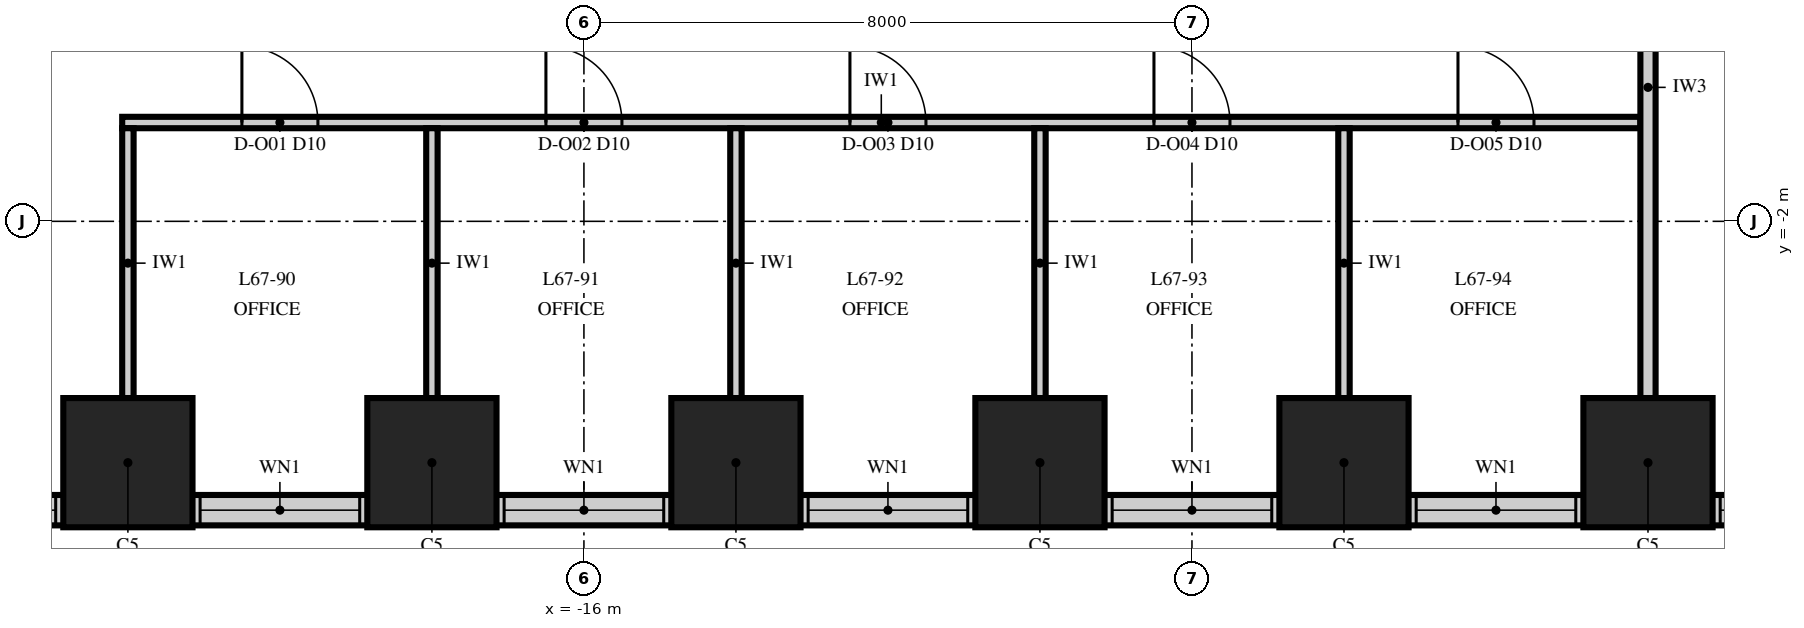
"""IFC4 building model, lengths in metres.
Left out: names, types, materials, properties, quantities, classifications, styles, units other than length and angle.
Written with IfcOpenShell. Run it as: python <this file> out.ifc"""

import sys

from ifc_helpers import new_model, si_unit, direction, frame, frame_2d, origin, origin_2d, place, context, subcontext, project, spatial, rectangle, extrude, element, fill, save


model = new_model("IFC4")
c1 = context("Model", 3, precision=1e-05, world=origin(), true_north=direction((0.0, 1.0)))
c2 = subcontext(c1, "Body", "Model", "MODEL_VIEW")
j1 = project(units=[si_unit("LENGTHUNIT", "METRE"), si_unit("PLANEANGLEUNIT", "RADIAN")], contexts=[c1])
p1 = place(None, origin())
s1 = spatial("IfcSite", under=j1, at=p1, CompositionType="ELEMENT")
p2 = place(p1, origin())
s2 = spatial("IfcBuilding", under=s1, at=p2, CompositionType="ELEMENT")
p3 = place(p2, frame((0.0, 0.0, 288.0)))
s3 = spatial("IfcBuildingStorey", under=s2, at=p3, CompositionType="ELEMENT", Elevation=288.0)
for number, where, z_axis, x_axis in (
    (1, (-22.0, -5.175, 0.0), (0.0, 0.0, 1.0), (1.0, 0.0, 0.0)),
    (2, (-18.0, -5.175, 0.0), (0.0, 0.0, 1.0), (1.0, 0.0, 0.0)),
    (3, (-14.0, -5.175, 0.0), (0.0, 0.0, 1.0), (1.0, 0.0, 0.0)),
    (4, (-10.0, -5.175, 0.0), (0.0, 0.0, 1.0), (1.0, 0.0, 0.0)),
    (5, (-6.0, -5.175, 0.0), (0.0, 0.0, 1.0), (1.0, 0.0, 0.0)),
    (6, (-2.0, -5.175, 0.0), (0.0, 0.0, 1.0), (1.0, 0.0, 0.0)),
):
    element("IfcColumn", number, at=place(p3, frame(where, z_axis=z_axis, x_axis=x_axis)), inside=s3, PredefinedType="COLUMN", context=c2, shape_type="SweptSolid", body=[
        extrude(rectangle(XDim=1.7, YDim=1.7, at=origin_2d()), origin(), (0.0, 0.0, 1.0), 4.0),
    ])
p4 = place(p3, frame((-26.0, -5.8, 0.0), z_axis=(0.0, 0.0, 1.0), x_axis=(1.0, 0.0, 0.0)))
e7 = element("IfcWall", 7, at=p4, inside=s3, PredefinedType="SOLIDWALL", context=c2, shape_type="SweptSolid", body=[
    extrude(rectangle(XDim=52.0, YDim=0.4, at=frame_2d((26.0, 0.0))), origin(), (0.0, 0.0, 1.0), 2.0),
])
p5 = place(p4, frame((0.95, 0.0, 0.8)))
e8 = element("IfcOpeningElement", 8, at=p5, cuts=e7, PredefinedType="OPENING", context=c2, shape_type="SweptSolid", body=[
    extrude(rectangle(XDim=2.1, YDim=1.15, at=frame_2d((1.05, 0.575))), frame((0.0, 0.215, 0.0), z_axis=(0.0, -1.0, 0.0), x_axis=(1.0, 0.0, 0.0)), (0.0, 0.0, 1.0), 0.43),
])
p6 = place(p4, frame((4.95, 0.0, 0.8)))
e9 = element("IfcOpeningElement", 9, at=p6, cuts=e7, PredefinedType="OPENING", context=c2, shape_type="SweptSolid", body=[
    extrude(rectangle(XDim=2.1, YDim=1.15, at=frame_2d((1.05, 0.575))), frame((0.0, 0.215, 0.0), z_axis=(0.0, -1.0, 0.0), x_axis=(1.0, 0.0, 0.0)), (0.0, 0.0, 1.0), 0.43),
])
p7 = place(p4, frame((8.95, 0.0, 0.8)))
e10 = element("IfcOpeningElement", 10, at=p7, cuts=e7, PredefinedType="OPENING", context=c2, shape_type="SweptSolid", body=[
    extrude(rectangle(XDim=2.1, YDim=1.15, at=frame_2d((1.05, 0.575))), frame((0.0, 0.215, 0.0), z_axis=(0.0, -1.0, 0.0), x_axis=(1.0, 0.0, 0.0)), (0.0, 0.0, 1.0), 0.43),
])
p8 = place(p4, frame((12.95, 0.0, 0.8)))
e11 = element("IfcOpeningElement", 11, at=p8, cuts=e7, PredefinedType="OPENING", context=c2, shape_type="SweptSolid", body=[
    extrude(rectangle(XDim=2.1, YDim=1.15, at=frame_2d((1.05, 0.575))), frame((0.0, 0.215, 0.0), z_axis=(0.0, -1.0, 0.0), x_axis=(1.0, 0.0, 0.0)), (0.0, 0.0, 1.0), 0.43),
])
p9 = place(p4, frame((16.95, 0.0, 0.8)))
e12 = element("IfcOpeningElement", 12, at=p9, cuts=e7, PredefinedType="OPENING", context=c2, shape_type="SweptSolid", body=[
    extrude(rectangle(XDim=2.1, YDim=1.15, at=frame_2d((1.05, 0.575))), frame((0.0, 0.215, 0.0), z_axis=(0.0, -1.0, 0.0), x_axis=(1.0, 0.0, 0.0)), (0.0, 0.0, 1.0), 0.43),
])
p10 = place(p4, frame((20.95, 0.0, 0.8)))
e13 = element("IfcOpeningElement", 13, at=p10, cuts=e7, PredefinedType="OPENING", context=c2, shape_type="SweptSolid", body=[
    extrude(rectangle(XDim=2.1, YDim=1.15, at=frame_2d((1.05, 0.575))), frame((0.0, 0.215, 0.0), z_axis=(0.0, -1.0, 0.0), x_axis=(1.0, 0.0, 0.0)), (0.0, 0.0, 1.0), 0.43),
])
p11 = place(p4, frame((24.95, 0.0, 0.8)))
e14 = element("IfcOpeningElement", 14, at=p11, cuts=e7, PredefinedType="OPENING", context=c2, shape_type="SweptSolid", body=[
    extrude(rectangle(XDim=2.1, YDim=1.15, at=frame_2d((1.05, 0.575))), frame((0.0, 0.215, 0.0), z_axis=(0.0, -1.0, 0.0), x_axis=(1.0, 0.0, 0.0)), (0.0, 0.0, 1.0), 0.43),
])
p12 = place(p4, frame((28.95, 0.0, 0.8)))
e15 = element("IfcOpeningElement", 15, at=p12, cuts=e7, PredefinedType="OPENING", context=c2, shape_type="SweptSolid", body=[
    extrude(rectangle(XDim=2.1, YDim=1.15, at=frame_2d((1.05, 0.575))), frame((0.0, 0.215, 0.0), z_axis=(0.0, -1.0, 0.0), x_axis=(1.0, 0.0, 0.0)), (0.0, 0.0, 1.0), 0.43),
])
p13 = place(p4, frame((32.95, 0.0, 0.8)))
e16 = element("IfcOpeningElement", 16, at=p13, cuts=e7, PredefinedType="OPENING", context=c2, shape_type="SweptSolid", body=[
    extrude(rectangle(XDim=2.1, YDim=1.15, at=frame_2d((1.05, 0.575))), frame((0.0, 0.215, 0.0), z_axis=(0.0, -1.0, 0.0), x_axis=(1.0, 0.0, 0.0)), (0.0, 0.0, 1.0), 0.43),
])
p14 = place(p4, frame((36.95, 0.0, 0.8)))
e17 = element("IfcOpeningElement", 17, at=p14, cuts=e7, PredefinedType="OPENING", context=c2, shape_type="SweptSolid", body=[
    extrude(rectangle(XDim=2.1, YDim=1.15, at=frame_2d((1.05, 0.575))), frame((0.0, 0.215, 0.0), z_axis=(0.0, -1.0, 0.0), x_axis=(1.0, 0.0, 0.0)), (0.0, 0.0, 1.0), 0.43),
])
p15 = place(p4, frame((40.95, 0.0, 0.8)))
e18 = element("IfcOpeningElement", 18, at=p15, cuts=e7, PredefinedType="OPENING", context=c2, shape_type="SweptSolid", body=[
    extrude(rectangle(XDim=2.1, YDim=1.15, at=frame_2d((1.05, 0.575))), frame((0.0, 0.215, 0.0), z_axis=(0.0, -1.0, 0.0), x_axis=(1.0, 0.0, 0.0)), (0.0, 0.0, 1.0), 0.43),
])
p16 = place(p4, frame((44.95, 0.0, 0.8)))
e19 = element("IfcOpeningElement", 19, at=p16, cuts=e7, PredefinedType="OPENING", context=c2, shape_type="SweptSolid", body=[
    extrude(rectangle(XDim=2.1, YDim=1.15, at=frame_2d((1.05, 0.575))), frame((0.0, 0.215, 0.0), z_axis=(0.0, -1.0, 0.0), x_axis=(1.0, 0.0, 0.0)), (0.0, 0.0, 1.0), 0.43),
])
p17 = place(p4, frame((48.95, 0.0, 0.8)))
e20 = element("IfcOpeningElement", 20, at=p17, cuts=e7, PredefinedType="OPENING", context=c2, shape_type="SweptSolid", body=[
    extrude(rectangle(XDim=2.1, YDim=1.15, at=frame_2d((1.05, 0.575))), frame((0.0, 0.215, 0.0), z_axis=(0.0, -1.0, 0.0), x_axis=(1.0, 0.0, 0.0)), (0.0, 0.0, 1.0), 0.43),
])
p18 = place(p3, frame((-22.075, -0.7, 0.0), z_axis=(0.0, 0.0, 1.0), x_axis=(1.0, 0.0, 0.0)))
e21 = element("IfcWall", 21, at=p18, inside=s3, PredefinedType="PARTITIONING", context=c2, shape_type="SweptSolid", body=[
    extrude(rectangle(XDim=19.975, YDim=0.15, at=frame_2d((9.987, 0.0))), origin(), (0.0, 0.0, 1.0), 3.23),
])
p19 = place(p18, frame((1.575, 0.0, 0.0)))
e22 = element("IfcOpeningElement", 22, at=p19, cuts=e21, PredefinedType="OPENING", context=c2, shape_type="SweptSolid", body=[
    extrude(rectangle(XDim=1.0, YDim=2.3, at=frame_2d((0.5, 1.15))), frame((0.0, 0.09, 0.0), z_axis=(0.0, -1.0, 0.0), x_axis=(1.0, 0.0, 0.0)), (0.0, 0.0, 1.0), 0.18),
])
p20 = place(p18, frame((5.575, 0.0, 0.0)))
e23 = element("IfcOpeningElement", 23, at=p20, cuts=e21, PredefinedType="OPENING", context=c2, shape_type="SweptSolid", body=[
    extrude(rectangle(XDim=1.0, YDim=2.3, at=frame_2d((0.5, 1.15))), frame((0.0, 0.09, 0.0), z_axis=(0.0, -1.0, 0.0), x_axis=(1.0, 0.0, 0.0)), (0.0, 0.0, 1.0), 0.18),
])
p21 = place(p18, frame((9.575, 0.0, 0.0)))
e24 = element("IfcOpeningElement", 24, at=p21, cuts=e21, PredefinedType="OPENING", context=c2, shape_type="SweptSolid", body=[
    extrude(rectangle(XDim=1.0, YDim=2.3, at=frame_2d((0.5, 1.15))), frame((0.0, 0.09, 0.0), z_axis=(0.0, -1.0, 0.0), x_axis=(1.0, 0.0, 0.0)), (0.0, 0.0, 1.0), 0.18),
])
p22 = place(p18, frame((13.575, 0.0, 0.0)))
e25 = element("IfcOpeningElement", 25, at=p22, cuts=e21, PredefinedType="OPENING", context=c2, shape_type="SweptSolid", body=[
    extrude(rectangle(XDim=1.0, YDim=2.3, at=frame_2d((0.5, 1.15))), frame((0.0, 0.09, 0.0), z_axis=(0.0, -1.0, 0.0), x_axis=(1.0, 0.0, 0.0)), (0.0, 0.0, 1.0), 0.18),
])
p23 = place(p18, frame((17.575, 0.0, 0.0)))
e26 = element("IfcOpeningElement", 26, at=p23, cuts=e21, PredefinedType="OPENING", context=c2, shape_type="SweptSolid", body=[
    extrude(rectangle(XDim=1.0, YDim=2.3, at=frame_2d((0.5, 1.15))), frame((0.0, 0.09, 0.0), z_axis=(0.0, -1.0, 0.0), x_axis=(1.0, 0.0, 0.0)), (0.0, 0.0, 1.0), 0.18),
])
for number, where, z_axis, x_axis in (
    (27, (-22.0, -4.325, 0.0), (0.0, 0.0, 1.0), (0.0, 1.0, 0.0)),
    (28, (-18.0, -4.325, 0.0), (0.0, 0.0, 1.0), (0.0, 1.0, 0.0)),
    (29, (-14.0, -4.325, 0.0), (0.0, 0.0, 1.0), (0.0, 1.0, 0.0)),
    (30, (-10.0, -4.325, 0.0), (0.0, 0.0, 1.0), (0.0, 1.0, 0.0)),
    (31, (-6.0, -4.325, 0.0), (0.0, 0.0, 1.0), (0.0, 1.0, 0.0)),
):
    element("IfcWall", number, at=place(p3, frame(where, z_axis=z_axis, x_axis=x_axis)), inside=s3, PredefinedType="PARTITIONING", context=c2, shape_type="SweptSolid", body=[
        extrude(rectangle(XDim=3.55, YDim=0.15, at=frame_2d((1.775, 0.0))), origin(), (0.0, 0.0, 1.0), 3.23),
    ])
p24 = place(p3, frame((-2.0, -4.325, 0.0), z_axis=(0.0, 0.0, 1.0), x_axis=(0.0, 1.0, 0.0)))
e32 = element("IfcWall", 32, at=p24, inside=s3, PredefinedType="PARTITIONING", context=c2, shape_type="SweptSolid", body=[
    extrude(rectangle(XDim=8.175, YDim=0.2, at=frame_2d((4.087, 0.0))), origin(), (0.0, 0.0, 1.0), 3.23),
])
p25 = place(p5, origin())
e33 = element("IfcWindow", 33, at=p25, inside=s3, PartitioningType="SINGLE_PANEL", PredefinedType="WINDOW", context=c2, shape_type="SweptSolid", body=[
    extrude(rectangle(XDim=2.1, YDim=1.15, at=frame_2d((1.05, 0.575))), frame((0.0, 0.03, 0.0), z_axis=(0.0, -1.0, 0.0), x_axis=(1.0, 0.0, 0.0)), (0.0, 0.0, 1.0), 0.06),
])
fill(e8, e33)
p26 = place(p6, origin())
e34 = element("IfcWindow", 34, at=p26, inside=s3, PartitioningType="SINGLE_PANEL", PredefinedType="WINDOW", context=c2, shape_type="SweptSolid", body=[
    extrude(rectangle(XDim=2.1, YDim=1.15, at=frame_2d((1.05, 0.575))), frame((0.0, 0.03, 0.0), z_axis=(0.0, -1.0, 0.0), x_axis=(1.0, 0.0, 0.0)), (0.0, 0.0, 1.0), 0.06),
])
fill(e9, e34)
p27 = place(p7, origin())
e35 = element("IfcWindow", 35, at=p27, inside=s3, PartitioningType="SINGLE_PANEL", PredefinedType="WINDOW", context=c2, shape_type="SweptSolid", body=[
    extrude(rectangle(XDim=2.1, YDim=1.15, at=frame_2d((1.05, 0.575))), frame((0.0, 0.03, 0.0), z_axis=(0.0, -1.0, 0.0), x_axis=(1.0, 0.0, 0.0)), (0.0, 0.0, 1.0), 0.06),
])
fill(e10, e35)
p28 = place(p8, origin())
e36 = element("IfcWindow", 36, at=p28, inside=s3, PartitioningType="SINGLE_PANEL", PredefinedType="WINDOW", context=c2, shape_type="SweptSolid", body=[
    extrude(rectangle(XDim=2.1, YDim=1.15, at=frame_2d((1.05, 0.575))), frame((0.0, 0.03, 0.0), z_axis=(0.0, -1.0, 0.0), x_axis=(1.0, 0.0, 0.0)), (0.0, 0.0, 1.0), 0.06),
])
fill(e11, e36)
p29 = place(p9, origin())
e37 = element("IfcWindow", 37, at=p29, inside=s3, PartitioningType="SINGLE_PANEL", PredefinedType="WINDOW", context=c2, shape_type="SweptSolid", body=[
    extrude(rectangle(XDim=2.1, YDim=1.15, at=frame_2d((1.05, 0.575))), frame((0.0, 0.03, 0.0), z_axis=(0.0, -1.0, 0.0), x_axis=(1.0, 0.0, 0.0)), (0.0, 0.0, 1.0), 0.06),
])
fill(e12, e37)
p30 = place(p10, origin())
e38 = element("IfcWindow", 38, at=p30, inside=s3, PartitioningType="SINGLE_PANEL", PredefinedType="WINDOW", context=c2, shape_type="SweptSolid", body=[
    extrude(rectangle(XDim=2.1, YDim=1.15, at=frame_2d((1.05, 0.575))), frame((0.0, 0.03, 0.0), z_axis=(0.0, -1.0, 0.0), x_axis=(1.0, 0.0, 0.0)), (0.0, 0.0, 1.0), 0.06),
])
fill(e13, e38)
p31 = place(p11, origin())
e39 = element("IfcWindow", 39, at=p31, inside=s3, PartitioningType="SINGLE_PANEL", PredefinedType="WINDOW", context=c2, shape_type="SweptSolid", body=[
    extrude(rectangle(XDim=2.1, YDim=1.15, at=frame_2d((1.05, 0.575))), frame((0.0, 0.03, 0.0), z_axis=(0.0, -1.0, 0.0), x_axis=(1.0, 0.0, 0.0)), (0.0, 0.0, 1.0), 0.06),
])
fill(e14, e39)
p32 = place(p19, origin())
e40 = element("IfcDoor", 40, at=p32, inside=s3, OperationType="SINGLE_SWING_LEFT", PredefinedType="DOOR", context=c2, shape_type="SweptSolid", body=[
    extrude(rectangle(XDim=1.0, YDim=2.3, at=frame_2d((0.5, 1.15))), frame((0.0, 0.075, 0.0), z_axis=(0.0, -1.0, 0.0), x_axis=(1.0, 0.0, 0.0)), (0.0, 0.0, 1.0), 0.149),
])
fill(e22, e40)
p33 = place(p20, origin())
e41 = element("IfcDoor", 41, at=p33, inside=s3, OperationType="SINGLE_SWING_LEFT", PredefinedType="DOOR", context=c2, shape_type="SweptSolid", body=[
    extrude(rectangle(XDim=1.0, YDim=2.3, at=frame_2d((0.5, 1.15))), frame((0.0, 0.075, 0.0), z_axis=(0.0, -1.0, 0.0), x_axis=(1.0, 0.0, 0.0)), (0.0, 0.0, 1.0), 0.149),
])
fill(e23, e41)
p34 = place(p21, origin())
e42 = element("IfcDoor", 42, at=p34, inside=s3, OperationType="SINGLE_SWING_LEFT", PredefinedType="DOOR", context=c2, shape_type="SweptSolid", body=[
    extrude(rectangle(XDim=1.0, YDim=2.3, at=frame_2d((0.5, 1.15))), frame((0.0, 0.075, 0.0), z_axis=(0.0, -1.0, 0.0), x_axis=(1.0, 0.0, 0.0)), (0.0, 0.0, 1.0), 0.149),
])
fill(e24, e42)
p35 = place(p22, origin())
e43 = element("IfcDoor", 43, at=p35, inside=s3, OperationType="SINGLE_SWING_LEFT", PredefinedType="DOOR", context=c2, shape_type="SweptSolid", body=[
    extrude(rectangle(XDim=1.0, YDim=2.3, at=frame_2d((0.5, 1.15))), frame((0.0, 0.075, 0.0), z_axis=(0.0, -1.0, 0.0), x_axis=(1.0, 0.0, 0.0)), (0.0, 0.0, 1.0), 0.149),
])
fill(e25, e43)
p36 = place(p23, origin())
e44 = element("IfcDoor", 44, at=p36, inside=s3, OperationType="SINGLE_SWING_LEFT", PredefinedType="DOOR", context=c2, shape_type="SweptSolid", body=[
    extrude(rectangle(XDim=1.0, YDim=2.3, at=frame_2d((0.5, 1.15))), frame((0.0, 0.075, 0.0), z_axis=(0.0, -1.0, 0.0), x_axis=(1.0, 0.0, 0.0)), (0.0, 0.0, 1.0), 0.149),
])
fill(e26, e44)
save(model, sys.argv[1])
